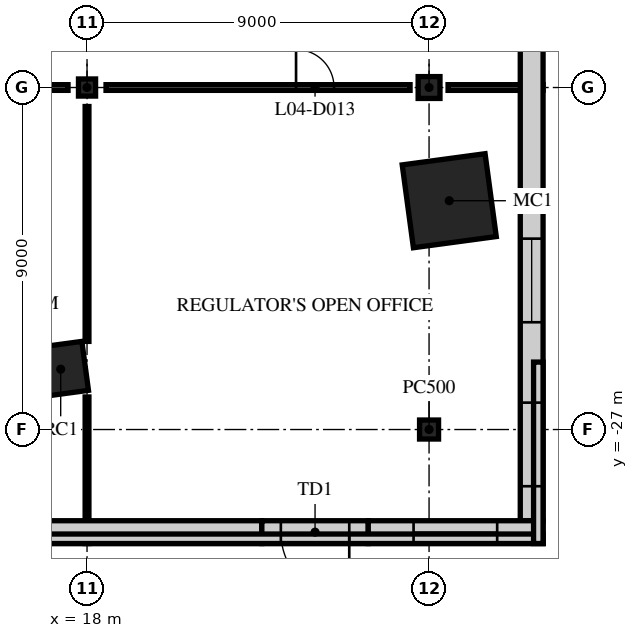
"""IFC4 building model, lengths in metres.
Left out: names, types, materials, properties, quantities, classifications, styles, units other than length and angle.
Written with IfcOpenShell. Run it as: python <this file> out.ifc"""

import sys

from ifc_helpers import new_model, si_unit, direction, frame, frame_2d, origin, origin_2d, place, context, subcontext, project, spatial, rectangle, extrude, element, fill, save


model = new_model("IFC4")
c1 = context("Model", 3, precision=1e-05, world=origin(), true_north=direction((0.0, 1.0)))
c2 = subcontext(c1, "Body", "Model", "MODEL_VIEW")
j1 = project(units=[si_unit("LENGTHUNIT", "METRE"), si_unit("PLANEANGLEUNIT", "RADIAN")], contexts=[c1])
p1 = place(None, origin())
s1 = spatial("IfcSite", under=j1, at=p1, CompositionType="ELEMENT")
p2 = place(p1, origin())
s2 = spatial("IfcBuilding", under=s1, at=p2, CompositionType="ELEMENT")
p3 = place(p2, frame((0.0, 0.0, 18.0)))
s3 = spatial("IfcBuildingStorey", under=s2, at=p3, CompositionType="ELEMENT", Elevation=18.0)
p4 = place(p3, frame((18.0, -18.0, 0.0), z_axis=(0.0, 0.0, 1.0), x_axis=(1.0, 0.0, 0.0)))
e1 = element("IfcColumn", 1, at=p4, inside=s3, PredefinedType="COLUMN", context=c2, shape_type="SweptSolid", body=[
    extrude(rectangle(XDim=0.45, YDim=0.45, at=origin_2d()), origin(), (0.0, 0.0, 1.0), 4.5),
])
p5 = place(p3, frame((27.0, -27.0, 0.0), z_axis=(0.0, 0.0, 1.0), x_axis=(1.0, 0.0, 0.0)))
e2 = element("IfcColumn", 2, at=p5, inside=s3, PredefinedType="COLUMN", context=c2, shape_type="SweptSolid", body=[
    extrude(rectangle(XDim=0.5, YDim=0.5, at=origin_2d()), origin(), (0.0, 0.0, 1.0), 4.5),
])
p6 = place(p3, frame((27.0, -18.0, 0.0), z_axis=(0.0, 0.0, 1.0), x_axis=(1.0, 0.0, 0.0)))
e3 = element("IfcColumn", 3, at=p6, inside=s3, PredefinedType="COLUMN", context=c2, shape_type="SweptSolid", body=[
    extrude(rectangle(XDim=0.575, YDim=0.575, at=origin_2d()), origin(), (0.0, 0.0, 1.0), 4.5),
])
p7 = place(p3, frame((17.307, -25.412, 0.0), z_axis=(0.0, 0.0, 1.0), x_axis=(0.991001197216, 0.133853005627, 0.0)))
e4 = element("IfcColumn", 4, at=p7, inside=s3, PredefinedType="COLUMN", context=c2, shape_type="SweptSolid", body=[
    extrude(rectangle(XDim=1.3, YDim=1.3, at=origin_2d()), origin(), (0.0, 0.0, 1.0), 4.5),
])
p8 = place(p3, frame((27.531, -20.979, 0.0), z_axis=(0.0, 0.0, 1.0), x_axis=(0.991001197216, 0.133853005627, 0.0)))
e5 = element("IfcColumn", 5, at=p8, inside=s3, PredefinedType="COLUMN", context=c2, shape_type="SweptSolid", body=[
    extrude(rectangle(XDim=2.2, YDim=2.2, at=origin_2d()), origin(), (0.0, 0.0, 1.0), 4.5),
])
p9 = place(p3, frame((9.5, -18.0, 0.0), z_axis=(0.0, 0.0, 1.0), x_axis=(1.0, 0.0, 0.0)))
e6 = element("IfcWall", 6, at=p9, inside=s3, PredefinedType="PARTITIONING", context=c2, shape_type="SweptSolid", body=[
    extrude(rectangle(XDim=8.0, YDim=0.15, at=frame_2d((4.0, 0.0))), origin(), (0.0, 0.0, 1.0), 3.53),
])
p10 = place(p9, frame((5.3, 0.0, 0.0)))
e7 = element("IfcOpeningElement", 7, at=p10, cuts=e6, PredefinedType="OPENING", context=c2, shape_type="SweptSolid", body=[
    extrude(rectangle(XDim=1.8, YDim=2.1, at=frame_2d((0.9, 1.05))), frame((0.0, 0.085, 0.0), z_axis=(0.0, -1.0, 0.0), x_axis=(1.0, 0.0, 0.0)), (0.0, 0.0, 1.0), 0.17),
])
p11 = place(p3, frame((18.5, -18.0, 0.0), z_axis=(0.0, 0.0, 1.0), x_axis=(1.0, 0.0, 0.0)))
e8 = element("IfcWall", 8, at=p11, inside=s3, PredefinedType="PARTITIONING", context=c2, shape_type="SweptSolid", body=[
    extrude(rectangle(XDim=8.0, YDim=0.15, at=frame_2d((4.0, 0.0))), origin(), (0.0, 0.0, 1.0), 3.53),
])
p12 = place(p11, frame((5.0, 0.0, 0.0)))
e9 = element("IfcOpeningElement", 9, at=p12, cuts=e8, PredefinedType="OPENING", context=c2, shape_type="SweptSolid", body=[
    extrude(rectangle(XDim=1.0, YDim=2.1, at=frame_2d((0.5, 1.05))), frame((0.0, 0.085, 0.0), z_axis=(0.0, -1.0, 0.0), x_axis=(1.0, 0.0, 0.0)), (0.0, 0.0, 1.0), 0.17),
])
p13 = place(p3, frame((27.5, -18.0, 0.0), z_axis=(0.0, 0.0, 1.0), x_axis=(1.0, 0.0, 0.0)))
e10 = element("IfcWall", 10, at=p13, inside=s3, PredefinedType="PARTITIONING", context=c2, shape_type="SweptSolid", body=[
    extrude(rectangle(XDim=2.5, YDim=0.15, at=frame_2d((1.25, 0.0))), origin(), (0.0, 0.0, 1.0), 3.23),
])
p14 = place(p3, frame((18.0, -30.0, 0.0), z_axis=(0.0, 0.0, 1.0), x_axis=(0.0, 1.0, 0.0)))
e11 = element("IfcWall", 11, at=p14, inside=s3, PredefinedType="PARTITIONING", context=c2, shape_type="SweptSolid", body=[
    extrude(rectangle(XDim=3.857, YDim=0.1, at=frame_2d((1.928, 0.0))), origin(), (0.0, 0.0, 1.0), 4.05),
])
p15 = place(p3, frame((18.0, -24.681, 0.0), z_axis=(0.0, 0.0, 1.0), x_axis=(0.0, 1.0, 0.0)))
e12 = element("IfcWall", 12, at=p15, inside=s3, PredefinedType="PARTITIONING", context=c2, shape_type="SweptSolid", body=[
    extrude(rectangle(XDim=6.181, YDim=0.1, at=frame_2d((3.09, 0.0))), origin(), (0.0, 0.0, 1.0), 3.53),
])
p16 = place(p3, frame((29.7, -29.4, 0.0), z_axis=(0.0, 0.0, 1.0), x_axis=(0.0, 1.0, 0.0)))
e13 = element("IfcWall", 13, at=p16, inside=s3, PredefinedType="STANDARD", context=c2, shape_type="SweptSolid", body=[
    extrude(rectangle(XDim=30.25, YDim=0.6, at=frame_2d((15.125, 0.0))), origin(), (0.0, 0.0, 1.0), 4.05),
])
p17 = place(p16, frame((0.908, 0.0, 0.9)))
e14 = element("IfcOpeningElement", 14, at=p17, cuts=e13, PredefinedType="OPENING", context=c2, shape_type="SweptSolid", body=[
    extrude(rectangle(XDim=2.2, YDim=3.0, at=frame_2d((1.1, 1.5))), frame((0.0, 0.31, 0.0), z_axis=(0.0, -1.0, 0.0), x_axis=(1.0, 0.0, 0.0)), (0.0, 0.0, 1.0), 0.62),
])
p18 = place(p16, frame((5.223, 0.0, 0.9)))
e15 = element("IfcOpeningElement", 15, at=p18, cuts=e13, PredefinedType="OPENING", context=c2, shape_type="SweptSolid", body=[
    extrude(rectangle(XDim=2.2, YDim=3.0, at=frame_2d((1.1, 1.5))), frame((0.0, 0.31, 0.0), z_axis=(0.0, -1.0, 0.0), x_axis=(1.0, 0.0, 0.0)), (0.0, 0.0, 1.0), 0.62),
])
p19 = place(p16, frame((23.685, 0.0, 0.9)))
e16 = element("IfcOpeningElement", 16, at=p19, cuts=e13, PredefinedType="OPENING", context=c2, shape_type="SweptSolid", body=[
    extrude(rectangle(XDim=2.2, YDim=3.0, at=frame_2d((1.1, 1.5))), frame((0.0, 0.31, 0.0), z_axis=(0.0, -1.0, 0.0), x_axis=(1.0, 0.0, 0.0)), (0.0, 0.0, 1.0), 0.62),
])
p20 = place(p3, frame((-22.6, -29.7, 0.0), z_axis=(0.0, 0.0, 1.0), x_axis=(1.0, 0.0, 0.0)))
e17 = element("IfcWall", 17, at=p20, inside=s3, PredefinedType="STANDARD", context=c2, shape_type="SweptSolid", body=[
    extrude(rectangle(XDim=45.2, YDim=0.6, at=frame_2d((22.6, 0.0))), origin(), (0.0, 0.0, 1.0), 4.05),
])
p21 = place(p20, frame((21.5, 0.0, 0.9)))
e18 = element("IfcOpeningElement", 18, at=p21, cuts=e17, PredefinedType="OPENING", context=c2, shape_type="SweptSolid", body=[
    extrude(rectangle(XDim=2.2, YDim=3.0, at=frame_2d((1.1, 1.5))), frame((0.0, 0.31, 0.0), z_axis=(0.0, -1.0, 0.0), x_axis=(1.0, 0.0, 0.0)), (0.0, 0.0, 1.0), 0.62),
])
p22 = place(p20, frame((30.731, 0.0, 0.9)))
e19 = element("IfcOpeningElement", 19, at=p22, cuts=e17, PredefinedType="OPENING", context=c2, shape_type="SweptSolid", body=[
    extrude(rectangle(XDim=2.2, YDim=3.0, at=frame_2d((1.1, 1.5))), frame((0.0, 0.31, 0.0), z_axis=(0.0, -1.0, 0.0), x_axis=(1.0, 0.0, 0.0)), (0.0, 0.0, 1.0), 0.62),
])
p23 = place(p3, frame((25.4, -29.7, 0.0), z_axis=(0.0, 0.0, 1.0), x_axis=(-1.0, 0.0, 0.0)))
e20 = element("IfcWall", 20, at=p23, inside=s3, PredefinedType="STANDARD", context=c2, shape_type="SweptSolid", body=[
    extrude(rectangle(XDim=2.8, YDim=0.6, at=frame_2d((1.4, 0.0))), origin(), (0.0, 0.0, 1.0), 4.05),
])
p24 = place(p23, frame((0.5, 0.0, 0.0)))
e21 = element("IfcOpeningElement", 21, at=p24, cuts=e20, PredefinedType="OPENING", context=c2, shape_type="SweptSolid", body=[
    extrude(rectangle(XDim=1.8, YDim=2.4, at=frame_2d((0.9, 1.2))), frame((0.0, 0.31, 0.0), z_axis=(0.0, -1.0, 0.0), x_axis=(1.0, 0.0, 0.0)), (0.0, 0.0, 1.0), 0.62),
])
p25 = place(p3, frame((25.4, -29.7, 0.0), z_axis=(0.0, 0.0, 1.0), x_axis=(1.0, 0.0, 0.0)))
e22 = element("IfcWall", 22, at=p25, inside=s3, PredefinedType="STANDARD", context=c2, shape_type="SweptSolid", body=[
    extrude(rectangle(XDim=4.6, YDim=0.6, at=frame_2d((2.3, 0.0))), origin(), (0.0, 0.0, 1.0), 4.05),
])
p26 = place(p25, frame((1.192, 0.0, 0.9)))
e23 = element("IfcOpeningElement", 23, at=p26, cuts=e22, PredefinedType="OPENING", context=c2, shape_type="SweptSolid", body=[
    extrude(rectangle(XDim=2.2, YDim=3.0, at=frame_2d((1.1, 1.5))), frame((0.0, 0.31, 0.0), z_axis=(0.0, -1.0, 0.0), x_axis=(1.0, 0.0, 0.0)), (0.0, 0.0, 1.0), 0.62),
])
p27 = place(p3, frame((7.453, -29.875, 4.5), z_axis=(0.0, 0.0, 1.0), x_axis=(1.0, 0.0, 0.0)))
e24 = element("IfcWall", 24, at=p27, inside=s3, PredefinedType="PARAPET", context=c2, shape_type="SweptSolid", body=[
    extrude(rectangle(XDim=22.547, YDim=0.25, at=frame_2d((11.273, 0.0))), origin(), (0.0, 0.0, 1.0), 1.1),
])
p28 = place(p3, frame((29.875, -30.0, 4.5), z_axis=(0.0, 0.0, 1.0), x_axis=(0.0, 1.0, 0.0)))
e25 = element("IfcWall", 25, at=p28, inside=s3, PredefinedType="PARAPET", context=c2, shape_type="SweptSolid", body=[
    extrude(rectangle(XDim=4.775, YDim=0.25, at=frame_2d((2.387, 0.0))), origin(), (0.0, 0.0, 1.0), 1.1),
])
p29 = place(p12, origin())
e26 = element("IfcDoor", 26, at=p29, inside=s3, OperationType="SINGLE_SWING_LEFT", PredefinedType="DOOR", context=c2, shape_type="SweptSolid", body=[
    extrude(rectangle(XDim=1.0, YDim=2.1, at=frame_2d((0.5, 1.05))), frame((0.0, 0.025, 0.0), z_axis=(0.0, -1.0, 0.0), x_axis=(1.0, 0.0, 0.0)), (0.0, 0.0, 1.0), 0.05),
])
fill(e9, e26)
p30 = place(p17, origin())
e27 = element("IfcWindow", 27, at=p30, inside=s3, PartitioningType="SINGLE_PANEL", PredefinedType="WINDOW", context=c2, shape_type="SweptSolid", body=[
    extrude(rectangle(XDim=2.2, YDim=3.0, at=frame_2d((1.1, 1.5))), frame((0.0, 0.03, 0.0), z_axis=(0.0, -1.0, 0.0), x_axis=(1.0, 0.0, 0.0)), (0.0, 0.0, 1.0), 0.06),
])
fill(e14, e27)
p31 = place(p18, origin())
e28 = element("IfcWindow", 28, at=p31, inside=s3, PartitioningType="SINGLE_PANEL", PredefinedType="WINDOW", context=c2, shape_type="SweptSolid", body=[
    extrude(rectangle(XDim=2.2, YDim=3.0, at=frame_2d((1.1, 1.5))), frame((0.0, 0.03, 0.0), z_axis=(0.0, -1.0, 0.0), x_axis=(1.0, 0.0, 0.0)), (0.0, 0.0, 1.0), 0.06),
])
fill(e15, e28)
p32 = place(p24, origin())
e29 = element("IfcDoor", 29, at=p32, inside=s3, OperationType="DOUBLE_DOOR_SINGLE_SWING", PredefinedType="DOOR", context=c2, shape_type="SweptSolid", body=[
    extrude(rectangle(XDim=1.8, YDim=2.4, at=frame_2d((0.9, 1.2))), frame((0.0, 0.025, 0.0), z_axis=(0.0, -1.0, 0.0), x_axis=(1.0, 0.0, 0.0)), (0.0, 0.0, 1.0), 0.05),
])
fill(e21, e29)
p33 = place(p26, origin())
e30 = element("IfcWindow", 30, at=p33, inside=s3, PartitioningType="SINGLE_PANEL", PredefinedType="WINDOW", context=c2, shape_type="SweptSolid", body=[
    extrude(rectangle(XDim=2.2, YDim=3.0, at=frame_2d((1.1, 1.5))), frame((0.0, 0.03, 0.0), z_axis=(0.0, -1.0, 0.0), x_axis=(1.0, 0.0, 0.0)), (0.0, 0.0, 1.0), 0.06),
])
fill(e23, e30)
save(model, sys.argv[1])
